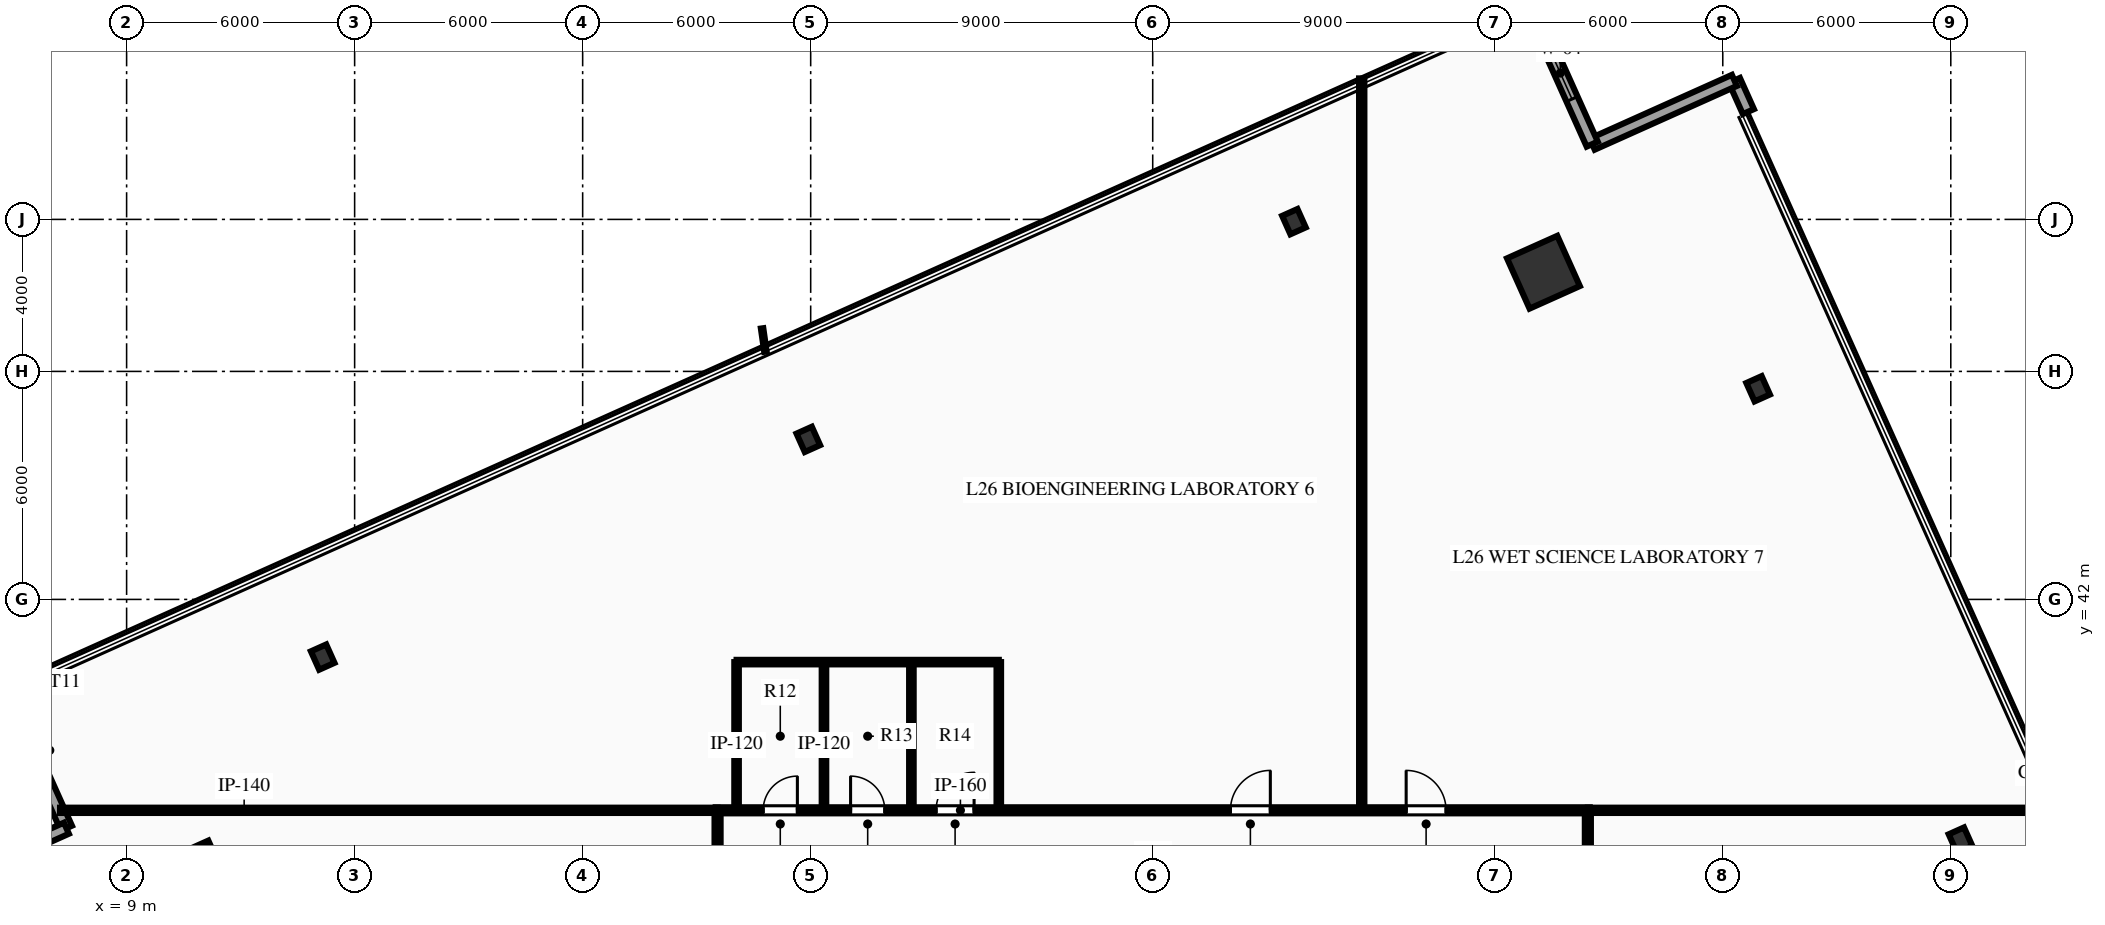
"""IFC4 building model, lengths in metres.
Left out: names, types, materials, properties, quantities, classifications, styles, units other than length and angle.
Written with IfcOpenShell. Run it as: python <this file> out.ifc"""

import sys

from ifc_helpers import new_model, si_unit, direction, frame, frame_2d, origin, origin_2d, place, context, subcontext, project, spatial, rectangle, hollow_rectangle, i_section, extrude, element, fill, save


model = new_model("IFC4")
c1 = context("Model", 3, precision=1e-05, world=origin(), true_north=direction((0.0, 1.0)))
c2 = subcontext(c1, "Body", "Model", "MODEL_VIEW")
j1 = project(units=[si_unit("LENGTHUNIT", "METRE"), si_unit("PLANEANGLEUNIT", "RADIAN")], contexts=[c1])
p1 = place(None, origin())
s1 = spatial("IfcSite", under=j1, at=p1, CompositionType="ELEMENT")
p2 = place(p1, origin())
s2 = spatial("IfcBuilding", under=s1, at=p2, CompositionType="ELEMENT")
p3 = place(p2, frame((0.0, 0.0, 109.2)))
s3 = spatial("IfcBuildingStorey", under=s2, at=p3, CompositionType="ELEMENT", Elevation=109.2)
for number, where, z_axis, x_axis in (
    (1, (46.281, 50.61, 0.0), (0.0, 0.0, 1.0), (0.912, 0.409, 0.0)),
    (2, (10.786, 34.695, 0.0), (0.0, 0.0, 1.0), (0.912, 0.409, 0.0)),
):
    element("IfcColumn", number, at=place(p3, frame(where, z_axis=z_axis, x_axis=x_axis)), inside=s3, PredefinedType="COLUMN", context=c2, shape_type="SweptSolid", body=[
        extrude(hollow_rectangle(XDim=1.45, YDim=1.45, WallThickness=0.07, at=origin_2d()), origin(), (0.0, 0.0, 1.0), 3.75),
    ])
for number, where, z_axis, x_axis in (
    (3, (57.255, 35.667, 0.0), (0.0, 0.0, 1.0), (0.912, 0.409, 0.0)),
    (4, (51.93, 47.543, 0.0), (0.0, 0.0, 1.0), (0.912, 0.409, 0.0)),
    (5, (39.716, 51.941, 0.0), (0.0, 0.0, 1.0), (0.912, 0.409, 0.0)),
    (6, (26.938, 46.211, 0.0), (0.0, 0.0, 1.0), (0.912, 0.409, 0.0)),
    (7, (14.159, 40.482, 0.0), (0.0, 0.0, 1.0), (0.912, 0.409, 0.0)),
):
    element("IfcColumn", number, at=place(p3, frame(where, z_axis=z_axis, x_axis=x_axis)), inside=s3, PredefinedType="COLUMN", context=c2, shape_type="SweptSolid", body=[
        extrude(i_section(OverallWidth=0.442, OverallDepth=0.531, WebThickness=0.066, FlangeThickness=0.106, at=origin_2d()), origin(), (0.0, 0.0, 1.0), 3.75),
    ])
p4 = place(p3, frame((51.306, 55.658, 0.0), z_axis=(0.0, 0.0, 1.0), x_axis=(0.409055904093, -0.912509324515, 0.0)))
e8 = element("IfcWall", 8, at=p4, inside=s3, PredefinedType="STANDARD", context=c2, shape_type="SweptSolid", body=[
    extrude(rectangle(XDim=0.9, YDim=0.32, at=frame_2d((0.45, 0.0))), origin(), (0.0, 0.0, 1.0), 3.45),
])
p5 = place(p3, frame((47.565, 53.98, 0.0), z_axis=(0.0, 0.0, 1.0), x_axis=(0.912473298974, 0.409136259283, 0.0)))
e9 = element("IfcWall", 9, at=p5, inside=s3, PredefinedType="STANDARD", context=c2, shape_type="SweptSolid", body=[
    extrude(rectangle(XDim=4.1, YDim=0.32, at=frame_2d((2.05, 0.0))), origin(), (0.0, 0.0, 1.0), 3.45),
])
p6 = place(p3, frame((45.887, 57.721, 0.0), z_axis=(0.0, 0.0, 1.0), x_axis=(0.409136259283, -0.912473298974, 0.0)))
e10 = element("IfcWall", 10, at=p6, inside=s3, PredefinedType="STANDARD", context=c2, shape_type="SweptSolid", body=[
    extrude(rectangle(XDim=4.1, YDim=0.32, at=frame_2d((2.05, 0.0))), origin(), (0.0, 0.0, 1.0), 3.45),
])
p7 = place(p6, frame((1.3, 0.0, 0.85)))
e11 = element("IfcOpeningElement", 11, at=p7, cuts=e10, PredefinedType="OPENING", context=c2, shape_type="SweptSolid", body=[
    extrude(rectangle(XDim=1.5, YDim=2.1, at=frame_2d((0.75, 1.05))), frame((0.0, 0.17, 0.0), z_axis=(0.0, -1.0, 0.0), x_axis=(1.0, 0.0, 0.0)), (0.0, 0.0, 1.0), 0.34),
])
p8 = place(p3, frame((7.416, 35.979, 0.0), z_axis=(0.0, 0.0, 1.0), x_axis=(-0.409136259283, 0.912473298974, 0.0)))
e12 = element("IfcWall", 12, at=p8, inside=s3, PredefinedType="STANDARD", context=c2, shape_type="SweptSolid", body=[
    extrude(rectangle(XDim=4.1, YDim=0.32, at=frame_2d((2.05, 0.0))), origin(), (0.0, 0.0, 1.0), 3.45),
])
p9 = place(p8, frame((1.475, 0.0, 0.0)))
e13 = element("IfcOpeningElement", 13, at=p9, cuts=e12, PredefinedType="OPENING", context=c2, shape_type="SweptSolid", body=[
    extrude(rectangle(XDim=1.15, YDim=2.2, at=frame_2d((0.575, 1.1))), frame((0.0, 0.17, 0.0), z_axis=(0.0, -1.0, 0.0), x_axis=(1.0, 0.0, 0.0)), (0.0, 0.0, 1.0), 0.34),
])
p10 = place(p3, frame((3.675, 34.301, 0.0), z_axis=(0.0, 0.0, 1.0), x_axis=(0.912473298974, 0.409136259283, 0.0)))
e14 = element("IfcWall", 14, at=p10, inside=s3, PredefinedType="STANDARD", context=c2, shape_type="SweptSolid", body=[
    extrude(rectangle(XDim=4.1, YDim=0.32, at=frame_2d((2.05, 0.0))), origin(), (0.0, 0.0, 1.0), 3.45),
])
p11 = place(p10, frame((1.3, 0.0, 0.85)))
e15 = element("IfcOpeningElement", 15, at=p11, cuts=e14, PredefinedType="OPENING", context=c2, shape_type="SweptSolid", body=[
    extrude(rectangle(XDim=1.5, YDim=2.1, at=frame_2d((0.75, 1.05))), frame((0.0, 0.17, 0.0), z_axis=(0.0, -1.0, 0.0), x_axis=(1.0, 0.0, 0.0)), (0.0, 0.0, 1.0), 0.34),
])
p12 = place(p3, frame((24.5, 36.45, 0.0), z_axis=(0.0, 0.0, 1.0), x_axis=(1.0, 0.0, 0.0)))
e16 = element("IfcWall", 16, at=p12, inside=s3, PredefinedType="PARTITIONING", context=c2, shape_type="SweptSolid", body=[
    extrude(rectangle(XDim=23.0, YDim=0.16, at=frame_2d((11.5, 0.0))), origin(), (0.0, 0.0, 1.0), 3.45),
])
p13 = place(p12, frame((1.25, 0.0, 0.0)))
e17 = element("IfcOpeningElement", 17, at=p13, cuts=e16, PredefinedType="OPENING", context=c2, shape_type="SweptSolid", body=[
    extrude(rectangle(XDim=0.9, YDim=2.15, at=frame_2d((0.45, 1.075))), frame((0.0, 0.09, 0.0), z_axis=(0.0, -1.0, 0.0), x_axis=(1.0, 0.0, 0.0)), (0.0, 0.0, 1.0), 0.18),
])
p14 = place(p12, frame((3.55, 0.0, 0.0)))
e18 = element("IfcOpeningElement", 18, at=p14, cuts=e16, PredefinedType="OPENING", context=c2, shape_type="SweptSolid", body=[
    extrude(rectangle(XDim=0.9, YDim=2.15, at=frame_2d((0.45, 1.075))), frame((0.0, 0.09, 0.0), z_axis=(0.0, -1.0, 0.0), x_axis=(1.0, 0.0, 0.0)), (0.0, 0.0, 1.0), 0.18),
])
p15 = place(p12, frame((5.8, 0.0, 0.0)))
e19 = element("IfcOpeningElement", 19, at=p15, cuts=e16, PredefinedType="OPENING", context=c2, shape_type="SweptSolid", body=[
    extrude(rectangle(XDim=1.0, YDim=2.15, at=frame_2d((0.5, 1.075))), frame((0.0, 0.09, 0.0), z_axis=(0.0, -1.0, 0.0), x_axis=(1.0, 0.0, 0.0)), (0.0, 0.0, 1.0), 0.18),
])
p16 = place(p12, frame((13.545, 0.0, 0.0)))
e20 = element("IfcOpeningElement", 20, at=p16, cuts=e16, PredefinedType="OPENING", context=c2, shape_type="SweptSolid", body=[
    extrude(rectangle(XDim=1.05, YDim=2.15, at=frame_2d((0.525, 1.075))), frame((0.0, 0.09, 0.0), z_axis=(0.0, -1.0, 0.0), x_axis=(1.0, 0.0, 0.0)), (0.0, 0.0, 1.0), 0.18),
])
p17 = place(p12, frame((18.169, 0.0, 0.0)))
e21 = element("IfcOpeningElement", 21, at=p17, cuts=e16, PredefinedType="OPENING", context=c2, shape_type="SweptSolid", body=[
    extrude(rectangle(XDim=1.05, YDim=2.15, at=frame_2d((0.525, 1.075))), frame((0.0, 0.09, 0.0), z_axis=(0.0, -1.0, 0.0), x_axis=(1.0, 0.0, 0.0)), (0.0, 0.0, 1.0), 0.18),
])
p18 = place(p3, frame((24.55, 15.55, 0.0), z_axis=(0.0, 0.0, 1.0), x_axis=(0.0, 1.0, 0.0)))
e22 = element("IfcWall", 22, at=p18, inside=s3, PredefinedType="PARTITIONING", context=c2, shape_type="SweptSolid", body=[
    extrude(rectangle(XDim=20.9, YDim=0.16, at=frame_2d((10.45, 0.0))), origin(), (0.0, 0.0, 1.0), 3.45),
])
p19 = place(p18, frame((5.075, 0.0, 0.0)))
e23 = element("IfcOpeningElement", 23, at=p19, cuts=e22, PredefinedType="OPENING", context=c2, shape_type="SweptSolid", body=[
    extrude(rectangle(XDim=0.95, YDim=2.15, at=frame_2d((0.475, 1.075))), frame((0.0, 0.09, 0.0), z_axis=(0.0, -1.0, 0.0), x_axis=(1.0, 0.0, 0.0)), (0.0, 0.0, 1.0), 0.18),
])
p20 = place(p18, frame((12.524, 0.0, 0.0)))
e24 = element("IfcOpeningElement", 24, at=p20, cuts=e22, PredefinedType="OPENING", context=c2, shape_type="SweptSolid", body=[
    extrude(rectangle(XDim=1.05, YDim=2.15, at=frame_2d((0.525, 1.075))), frame((0.0, 0.09, 0.0), z_axis=(0.0, -1.0, 0.0), x_axis=(1.0, 0.0, 0.0)), (0.0, 0.0, 1.0), 0.18),
])
p21 = place(p3, frame((47.45, 15.55, 0.0), z_axis=(0.0, 0.0, 1.0), x_axis=(0.0, 1.0, 0.0)))
e25 = element("IfcWall", 25, at=p21, inside=s3, PredefinedType="PARTITIONING", context=c2, shape_type="SweptSolid", body=[
    extrude(rectangle(XDim=20.9, YDim=0.16, at=frame_2d((10.45, 0.0))), origin(), (0.0, 0.0, 1.0), 3.45),
])
p22 = place(p21, frame((3.067, 0.0, 0.0)))
e26 = element("IfcOpeningElement", 26, at=p22, cuts=e25, PredefinedType="OPENING", context=c2, shape_type="SweptSolid", body=[
    extrude(rectangle(XDim=1.05, YDim=2.15, at=frame_2d((0.525, 1.075))), frame((0.0, 0.09, 0.0), z_axis=(0.0, -1.0, 0.0), x_axis=(1.0, 0.0, 0.0)), (0.0, 0.0, 1.0), 0.18),
])
p23 = place(p21, frame((7.915, 0.0, 0.0)))
e27 = element("IfcOpeningElement", 27, at=p23, cuts=e25, PredefinedType="OPENING", context=c2, shape_type="SweptSolid", body=[
    extrude(rectangle(XDim=1.05, YDim=2.15, at=frame_2d((0.525, 1.075))), frame((0.0, 0.09, 0.0), z_axis=(0.0, -1.0, 0.0), x_axis=(1.0, 0.0, 0.0)), (0.0, 0.0, 1.0), 0.18),
])
p24 = place(p21, frame((11.661, 0.0, 0.0)))
e28 = element("IfcOpeningElement", 28, at=p24, cuts=e25, PredefinedType="OPENING", context=c2, shape_type="SweptSolid", body=[
    extrude(rectangle(XDim=1.05, YDim=2.15, at=frame_2d((0.525, 1.075))), frame((0.0, 0.09, 0.0), z_axis=(0.0, -1.0, 0.0), x_axis=(1.0, 0.0, 0.0)), (0.0, 0.0, 1.0), 0.18),
])
p25 = place(p21, frame((16.987, 0.0, 0.0)))
e29 = element("IfcOpeningElement", 29, at=p25, cuts=e25, PredefinedType="OPENING", context=c2, shape_type="SweptSolid", body=[
    extrude(rectangle(XDim=1.05, YDim=2.15, at=frame_2d((0.525, 1.075))), frame((0.0, 0.09, 0.0), z_axis=(0.0, -1.0, 0.0), x_axis=(1.0, 0.0, 0.0)), (0.0, 0.0, 1.0), 0.18),
])
p26 = place(p3, frame((25.05, 36.45, 0.0), z_axis=(0.0, 0.0, 1.0), x_axis=(0.0, 1.0, 0.0)))
e30 = element("IfcWall", 30, at=p26, inside=s3, PredefinedType="PARTITIONING", context=c2, shape_type="SweptSolid", body=[
    extrude(rectangle(XDim=3.9, YDim=0.12, at=frame_2d((1.95, 0.0))), origin(), (0.0, 0.0, 1.0), 3.45),
])
p27 = place(p3, frame((27.35, 36.45, 0.0), z_axis=(0.0, 0.0, 1.0), x_axis=(0.0, 1.0, 0.0)))
e31 = element("IfcWall", 31, at=p27, inside=s3, PredefinedType="PARTITIONING", context=c2, shape_type="SweptSolid", body=[
    extrude(rectangle(XDim=3.9, YDim=0.12, at=frame_2d((1.95, 0.0))), origin(), (0.0, 0.0, 1.0), 2.749),
])
for number, where, z_axis, x_axis in (
    (32, (29.65, 36.45, 0.0), (0.0, 0.0, 1.0), (0.0, 1.0, 0.0)),
    (33, (31.95, 36.45, 0.0), (0.0, 0.0, 1.0), (0.0, 1.0, 0.0)),
):
    element("IfcWall", number, at=place(p3, frame(where, z_axis=z_axis, x_axis=x_axis)), inside=s3, PredefinedType="PARTITIONING", context=c2, shape_type="SweptSolid", body=[
        extrude(rectangle(XDim=3.9, YDim=0.12, at=frame_2d((1.95, 0.0))), origin(), (0.0, 0.0, 1.0), 3.45),
    ])
p28 = place(p3, frame((25.05, 40.35, 0.0), z_axis=(0.0, 0.0, 1.0), x_axis=(1.0, 0.0, 0.0)))
e34 = element("IfcWall", 34, at=p28, inside=s3, PredefinedType="PARTITIONING", context=c2, shape_type="SweptSolid", body=[
    extrude(rectangle(XDim=6.9, YDim=0.12, at=frame_2d((3.45, 0.0))), origin(), (0.0, 0.0, 1.0), 3.45),
])
p29 = place(p3, frame((7.248, 36.45, 0.0), z_axis=(0.0, 0.0, 1.0), x_axis=(1.0, 0.0, 0.0)))
e35 = element("IfcWall", 35, at=p29, inside=s3, PredefinedType="PARTITIONING", context=c2, shape_type="SweptSolid", body=[
    extrude(rectangle(XDim=17.302, YDim=0.14, at=frame_2d((8.651, 0.0))), origin(), (0.0, 0.0, 1.0), 3.45),
])
p30 = place(p3, frame((47.45, 36.45, 0.0), z_axis=(0.0, 0.0, 1.0), x_axis=(1.0, 0.0, 0.0)))
e36 = element("IfcWall", 36, at=p30, inside=s3, PredefinedType="PARTITIONING", context=c2, shape_type="SweptSolid", body=[
    extrude(rectangle(XDim=12.424, YDim=0.14, at=frame_2d((6.212, 0.0))), origin(), (0.0, 0.0, 1.0), 3.45),
])
p31 = place(p3, frame((41.5, 36.45, 0.0), z_axis=(0.0, 0.0, 1.0), x_axis=(0.0, 1.0, 0.0)))
e37 = element("IfcWall", 37, at=p31, inside=s3, PredefinedType="PARTITIONING", context=c2, shape_type="SweptSolid", body=[
    extrude(rectangle(XDim=19.261, YDim=0.14, at=frame_2d((9.63, 0.0))), origin(), (0.0, 0.0, 1.0), 3.45),
])
p32 = place(p7, origin())
e38 = element("IfcWindow", 38, at=p32, inside=s3, PartitioningType="SINGLE_PANEL", PredefinedType="WINDOW", context=c2, shape_type="SweptSolid", body=[
    extrude(rectangle(XDim=1.5, YDim=2.1, at=frame_2d((0.75, 1.05))), frame((0.0, 0.03, 0.0), z_axis=(0.0, -1.0, 0.0), x_axis=(1.0, 0.0, 0.0)), (0.0, 0.0, 1.0), 0.06),
])
fill(e11, e38)
p33 = place(p13, origin())
e39 = element("IfcDoor", 39, at=p33, inside=s3, OperationType="SINGLE_SWING_RIGHT", PredefinedType="DOOR", context=c2, shape_type="SweptSolid", body=[
    extrude(rectangle(XDim=0.9, YDim=2.15, at=frame_2d((0.45, 1.075))), frame((0.0, 0.025, 0.0), z_axis=(0.0, -1.0, 0.0), x_axis=(1.0, 0.0, 0.0)), (0.0, 0.0, 1.0), 0.05),
])
fill(e17, e39)
p34 = place(p14, origin())
e40 = element("IfcDoor", 40, at=p34, inside=s3, OperationType="SINGLE_SWING_LEFT", PredefinedType="DOOR", context=c2, shape_type="SweptSolid", body=[
    extrude(rectangle(XDim=0.9, YDim=2.15, at=frame_2d((0.45, 1.075))), frame((0.0, 0.025, 0.0), z_axis=(0.0, -1.0, 0.0), x_axis=(1.0, 0.0, 0.0)), (0.0, 0.0, 1.0), 0.05),
])
fill(e18, e40)
p35 = place(p15, origin())
e41 = element("IfcDoor", 41, at=p35, inside=s3, OperationType="SINGLE_SWING_RIGHT", PredefinedType="DOOR", context=c2, shape_type="SweptSolid", body=[
    extrude(rectangle(XDim=1.0, YDim=2.15, at=frame_2d((0.5, 1.075))), frame((0.0, 0.025, 0.0), z_axis=(0.0, -1.0, 0.0), x_axis=(1.0, 0.0, 0.0)), (0.0, 0.0, 1.0), 0.05),
])
fill(e19, e41)
p36 = place(p16, origin())
e42 = element("IfcDoor", 42, at=p36, inside=s3, OperationType="SINGLE_SWING_RIGHT", PredefinedType="DOOR", context=c2, shape_type="SweptSolid", body=[
    extrude(rectangle(XDim=1.05, YDim=2.15, at=frame_2d((0.525, 1.075))), frame((0.0, 0.025, 0.0), z_axis=(0.0, -1.0, 0.0), x_axis=(1.0, 0.0, 0.0)), (0.0, 0.0, 1.0), 0.05),
])
fill(e20, e42)
p37 = place(p17, origin())
e43 = element("IfcDoor", 43, at=p37, inside=s3, OperationType="SINGLE_SWING_LEFT", PredefinedType="DOOR", context=c2, shape_type="SweptSolid", body=[
    extrude(rectangle(XDim=1.05, YDim=2.15, at=frame_2d((0.525, 1.075))), frame((0.0, 0.025, 0.0), z_axis=(0.0, -1.0, 0.0), x_axis=(1.0, 0.0, 0.0)), (0.0, 0.0, 1.0), 0.05),
])
fill(e21, e43)
save(model, sys.argv[1])
